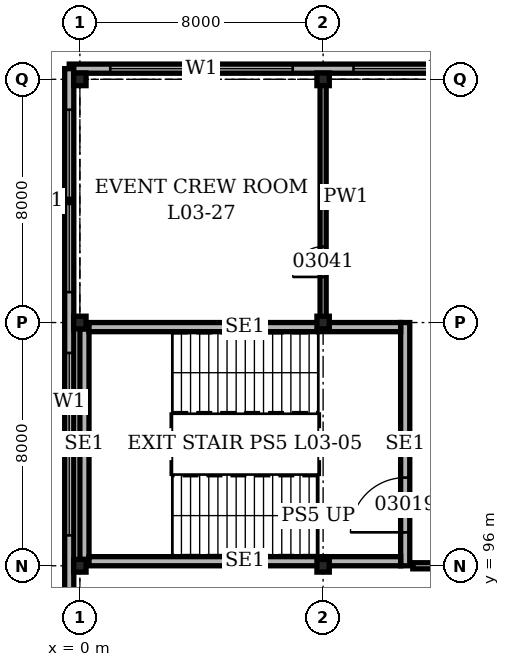
"""IFC4 building model, lengths in metres.
Left out: names, types, materials, properties, quantities, classifications, styles, units other than length and angle.
Written with IfcOpenShell. Run it as: python <this file> out.ifc"""

import sys

from ifc_helpers import new_model, si_unit, direction, frame, frame_2d, origin, origin_2d, place, context, subcontext, project, spatial, rectangle, i_section, extrude, element, fill, save


model = new_model("IFC4")
c1 = context("Model", 3, precision=1e-05, world=origin(), true_north=direction((0.0, 1.0)))
c2 = subcontext(c1, "Body", "Model", "MODEL_VIEW")
j1 = project(units=[si_unit("LENGTHUNIT", "METRE"), si_unit("PLANEANGLEUNIT", "RADIAN")], contexts=[c1])
p1 = place(None, origin())
s1 = spatial("IfcSite", under=j1, at=p1, CompositionType="ELEMENT")
p2 = place(p1, origin())
s2 = spatial("IfcBuilding", under=s1, at=p2, CompositionType="ELEMENT")
p3 = place(p2, frame((0.0, 0.0, 14.9)))
s3 = spatial("IfcBuildingStorey", under=s2, at=p3, CompositionType="ELEMENT", Elevation=14.9)
for number, where, z_axis, x_axis in (
    (1, (0.0, 96.0, 0.0), (0.0, 0.0, 1.0), (1.0, 0.0, 0.0)),
    (2, (0.0, 104.0, 0.0), (0.0, 0.0, 1.0), (1.0, 0.0, 0.0)),
    (3, (0.0, 112.0, 0.0), (0.0, 0.0, 1.0), (1.0, 0.0, 0.0)),
    (4, (8.0, 96.0, 0.0), (0.0, 0.0, 1.0), (1.0, 0.0, 0.0)),
    (5, (8.0, 104.0, 0.0), (0.0, 0.0, 1.0), (1.0, 0.0, 0.0)),
    (6, (8.0, 112.0, 0.0), (0.0, 0.0, 1.0), (1.0, 0.0, 0.0)),
):
    element("IfcColumn", number, at=place(p3, frame(where, z_axis=z_axis, x_axis=x_axis)), inside=s3, PredefinedType="COLUMN", context=c2, shape_type="SweptSolid", body=[
        extrude(i_section(OverallWidth=0.406, OverallDepth=0.417, WebThickness=0.03, FlangeThickness=0.048, at=origin_2d()), origin(), (0.0, 0.0, 1.0), 5.0),
    ])
p4 = place(p3, frame((112.35, 112.35, 0.0), z_axis=(0.0, 0.0, 1.0), x_axis=(-1.0, 0.0, 0.0)))
e7 = element("IfcWall", 7, at=p4, inside=s3, PredefinedType="SOLIDWALL", context=c2, shape_type="SweptSolid", body=[
    extrude(rectangle(XDim=112.7, YDim=0.3, at=frame_2d((56.35, 0.0))), origin(), (0.0, 0.0, 1.0), 5.0),
])
p5 = place(p4, frame((1.35, 0.0, 1.0)))
e8 = element("IfcOpeningElement", 8, at=p5, cuts=e7, PredefinedType="OPENING", context=c2, shape_type="SweptSolid", body=[
    extrude(rectangle(XDim=6.0, YDim=1.5, at=frame_2d((3.0, 0.75))), frame((0.0, 0.16, 0.0), z_axis=(0.0, -1.0, 0.0), x_axis=(1.0, 0.0, 0.0)), (0.0, 0.0, 1.0), 0.32),
])
p6 = place(p4, frame((9.35, 0.0, 1.0)))
e9 = element("IfcOpeningElement", 9, at=p6, cuts=e7, PredefinedType="OPENING", context=c2, shape_type="SweptSolid", body=[
    extrude(rectangle(XDim=6.0, YDim=1.5, at=frame_2d((3.0, 0.75))), frame((0.0, 0.16, 0.0), z_axis=(0.0, -1.0, 0.0), x_axis=(1.0, 0.0, 0.0)), (0.0, 0.0, 1.0), 0.32),
])
p7 = place(p4, frame((17.35, 0.0, 1.0)))
e10 = element("IfcOpeningElement", 10, at=p7, cuts=e7, PredefinedType="OPENING", context=c2, shape_type="SweptSolid", body=[
    extrude(rectangle(XDim=6.0, YDim=1.5, at=frame_2d((3.0, 0.75))), frame((0.0, 0.16, 0.0), z_axis=(0.0, -1.0, 0.0), x_axis=(1.0, 0.0, 0.0)), (0.0, 0.0, 1.0), 0.32),
])
p8 = place(p4, frame((25.35, 0.0, 1.0)))
e11 = element("IfcOpeningElement", 11, at=p8, cuts=e7, PredefinedType="OPENING", context=c2, shape_type="SweptSolid", body=[
    extrude(rectangle(XDim=6.0, YDim=1.5, at=frame_2d((3.0, 0.75))), frame((0.0, 0.16, 0.0), z_axis=(0.0, -1.0, 0.0), x_axis=(1.0, 0.0, 0.0)), (0.0, 0.0, 1.0), 0.32),
])
p9 = place(p4, frame((33.35, 0.0, 1.0)))
e12 = element("IfcOpeningElement", 12, at=p9, cuts=e7, PredefinedType="OPENING", context=c2, shape_type="SweptSolid", body=[
    extrude(rectangle(XDim=6.0, YDim=1.5, at=frame_2d((3.0, 0.75))), frame((0.0, 0.16, 0.0), z_axis=(0.0, -1.0, 0.0), x_axis=(1.0, 0.0, 0.0)), (0.0, 0.0, 1.0), 0.32),
])
p10 = place(p4, frame((41.35, 0.0, 1.0)))
e13 = element("IfcOpeningElement", 13, at=p10, cuts=e7, PredefinedType="OPENING", context=c2, shape_type="SweptSolid", body=[
    extrude(rectangle(XDim=6.0, YDim=1.5, at=frame_2d((3.0, 0.75))), frame((0.0, 0.16, 0.0), z_axis=(0.0, -1.0, 0.0), x_axis=(1.0, 0.0, 0.0)), (0.0, 0.0, 1.0), 0.32),
])
p11 = place(p4, frame((49.35, 0.0, 1.0)))
e14 = element("IfcOpeningElement", 14, at=p11, cuts=e7, PredefinedType="OPENING", context=c2, shape_type="SweptSolid", body=[
    extrude(rectangle(XDim=6.0, YDim=1.5, at=frame_2d((3.0, 0.75))), frame((0.0, 0.16, 0.0), z_axis=(0.0, -1.0, 0.0), x_axis=(1.0, 0.0, 0.0)), (0.0, 0.0, 1.0), 0.32),
])
p12 = place(p4, frame((57.35, 0.0, 1.0)))
e15 = element("IfcOpeningElement", 15, at=p12, cuts=e7, PredefinedType="OPENING", context=c2, shape_type="SweptSolid", body=[
    extrude(rectangle(XDim=6.0, YDim=1.5, at=frame_2d((3.0, 0.75))), frame((0.0, 0.16, 0.0), z_axis=(0.0, -1.0, 0.0), x_axis=(1.0, 0.0, 0.0)), (0.0, 0.0, 1.0), 0.32),
])
p13 = place(p4, frame((65.35, 0.0, 1.0)))
e16 = element("IfcOpeningElement", 16, at=p13, cuts=e7, PredefinedType="OPENING", context=c2, shape_type="SweptSolid", body=[
    extrude(rectangle(XDim=6.0, YDim=1.5, at=frame_2d((3.0, 0.75))), frame((0.0, 0.16, 0.0), z_axis=(0.0, -1.0, 0.0), x_axis=(1.0, 0.0, 0.0)), (0.0, 0.0, 1.0), 0.32),
])
p14 = place(p4, frame((73.35, 0.0, 1.0)))
e17 = element("IfcOpeningElement", 17, at=p14, cuts=e7, PredefinedType="OPENING", context=c2, shape_type="SweptSolid", body=[
    extrude(rectangle(XDim=6.0, YDim=1.5, at=frame_2d((3.0, 0.75))), frame((0.0, 0.16, 0.0), z_axis=(0.0, -1.0, 0.0), x_axis=(1.0, 0.0, 0.0)), (0.0, 0.0, 1.0), 0.32),
])
p15 = place(p4, frame((81.35, 0.0, 1.0)))
e18 = element("IfcOpeningElement", 18, at=p15, cuts=e7, PredefinedType="OPENING", context=c2, shape_type="SweptSolid", body=[
    extrude(rectangle(XDim=6.0, YDim=1.5, at=frame_2d((3.0, 0.75))), frame((0.0, 0.16, 0.0), z_axis=(0.0, -1.0, 0.0), x_axis=(1.0, 0.0, 0.0)), (0.0, 0.0, 1.0), 0.32),
])
p16 = place(p4, frame((89.35, 0.0, 1.0)))
e19 = element("IfcOpeningElement", 19, at=p16, cuts=e7, PredefinedType="OPENING", context=c2, shape_type="SweptSolid", body=[
    extrude(rectangle(XDim=6.0, YDim=1.5, at=frame_2d((3.0, 0.75))), frame((0.0, 0.16, 0.0), z_axis=(0.0, -1.0, 0.0), x_axis=(1.0, 0.0, 0.0)), (0.0, 0.0, 1.0), 0.32),
])
p17 = place(p4, frame((97.35, 0.0, 1.0)))
e20 = element("IfcOpeningElement", 20, at=p17, cuts=e7, PredefinedType="OPENING", context=c2, shape_type="SweptSolid", body=[
    extrude(rectangle(XDim=6.0, YDim=1.5, at=frame_2d((3.0, 0.75))), frame((0.0, 0.16, 0.0), z_axis=(0.0, -1.0, 0.0), x_axis=(1.0, 0.0, 0.0)), (0.0, 0.0, 1.0), 0.32),
])
p18 = place(p4, frame((105.35, 0.0, 1.0)))
e21 = element("IfcOpeningElement", 21, at=p18, cuts=e7, PredefinedType="OPENING", context=c2, shape_type="SweptSolid", body=[
    extrude(rectangle(XDim=6.0, YDim=1.5, at=frame_2d((3.0, 0.75))), frame((0.0, 0.16, 0.0), z_axis=(0.0, -1.0, 0.0), x_axis=(1.0, 0.0, 0.0)), (0.0, 0.0, 1.0), 0.32),
])
p19 = place(p3, frame((-0.35, 112.35, 0.0), z_axis=(0.0, 0.0, 1.0), x_axis=(0.0, -1.0, 0.0)))
e22 = element("IfcWall", 22, at=p19, inside=s3, PredefinedType="SOLIDWALL", context=c2, shape_type="SweptSolid", body=[
    extrude(rectangle(XDim=112.7, YDim=0.3, at=frame_2d((56.35, 0.0))), origin(), (0.0, 0.0, 1.0), 5.0),
])
p20 = place(p19, frame((1.35, 0.0, 1.0)))
e23 = element("IfcOpeningElement", 23, at=p20, cuts=e22, PredefinedType="OPENING", context=c2, shape_type="SweptSolid", body=[
    extrude(rectangle(XDim=6.0, YDim=1.5, at=frame_2d((3.0, 0.75))), frame((0.0, 0.16, 0.0), z_axis=(0.0, -1.0, 0.0), x_axis=(1.0, 0.0, 0.0)), (0.0, 0.0, 1.0), 0.32),
])
p21 = place(p19, frame((9.35, 0.0, 1.0)))
e24 = element("IfcOpeningElement", 24, at=p21, cuts=e22, PredefinedType="OPENING", context=c2, shape_type="SweptSolid", body=[
    extrude(rectangle(XDim=6.0, YDim=1.5, at=frame_2d((3.0, 0.75))), frame((0.0, 0.16, 0.0), z_axis=(0.0, -1.0, 0.0), x_axis=(1.0, 0.0, 0.0)), (0.0, 0.0, 1.0), 0.32),
])
p22 = place(p19, frame((17.35, 0.0, 1.0)))
e25 = element("IfcOpeningElement", 25, at=p22, cuts=e22, PredefinedType="OPENING", context=c2, shape_type="SweptSolid", body=[
    extrude(rectangle(XDim=6.0, YDim=1.5, at=frame_2d((3.0, 0.75))), frame((0.0, 0.16, 0.0), z_axis=(0.0, -1.0, 0.0), x_axis=(1.0, 0.0, 0.0)), (0.0, 0.0, 1.0), 0.32),
])
p23 = place(p19, frame((25.35, 0.0, 1.0)))
e26 = element("IfcOpeningElement", 26, at=p23, cuts=e22, PredefinedType="OPENING", context=c2, shape_type="SweptSolid", body=[
    extrude(rectangle(XDim=6.0, YDim=1.5, at=frame_2d((3.0, 0.75))), frame((0.0, 0.16, 0.0), z_axis=(0.0, -1.0, 0.0), x_axis=(1.0, 0.0, 0.0)), (0.0, 0.0, 1.0), 0.32),
])
p24 = place(p19, frame((33.35, 0.0, 1.0)))
e27 = element("IfcOpeningElement", 27, at=p24, cuts=e22, PredefinedType="OPENING", context=c2, shape_type="SweptSolid", body=[
    extrude(rectangle(XDim=6.0, YDim=1.5, at=frame_2d((3.0, 0.75))), frame((0.0, 0.16, 0.0), z_axis=(0.0, -1.0, 0.0), x_axis=(1.0, 0.0, 0.0)), (0.0, 0.0, 1.0), 0.32),
])
p25 = place(p19, frame((41.35, 0.0, 1.0)))
e28 = element("IfcOpeningElement", 28, at=p25, cuts=e22, PredefinedType="OPENING", context=c2, shape_type="SweptSolid", body=[
    extrude(rectangle(XDim=6.0, YDim=1.5, at=frame_2d((3.0, 0.75))), frame((0.0, 0.16, 0.0), z_axis=(0.0, -1.0, 0.0), x_axis=(1.0, 0.0, 0.0)), (0.0, 0.0, 1.0), 0.32),
])
p26 = place(p19, frame((49.35, 0.0, 1.0)))
e29 = element("IfcOpeningElement", 29, at=p26, cuts=e22, PredefinedType="OPENING", context=c2, shape_type="SweptSolid", body=[
    extrude(rectangle(XDim=6.0, YDim=1.5, at=frame_2d((3.0, 0.75))), frame((0.0, 0.16, 0.0), z_axis=(0.0, -1.0, 0.0), x_axis=(1.0, 0.0, 0.0)), (0.0, 0.0, 1.0), 0.32),
])
p27 = place(p19, frame((57.35, 0.0, 1.0)))
e30 = element("IfcOpeningElement", 30, at=p27, cuts=e22, PredefinedType="OPENING", context=c2, shape_type="SweptSolid", body=[
    extrude(rectangle(XDim=6.0, YDim=1.5, at=frame_2d((3.0, 0.75))), frame((0.0, 0.16, 0.0), z_axis=(0.0, -1.0, 0.0), x_axis=(1.0, 0.0, 0.0)), (0.0, 0.0, 1.0), 0.32),
])
p28 = place(p19, frame((65.35, 0.0, 1.0)))
e31 = element("IfcOpeningElement", 31, at=p28, cuts=e22, PredefinedType="OPENING", context=c2, shape_type="SweptSolid", body=[
    extrude(rectangle(XDim=6.0, YDim=1.5, at=frame_2d((3.0, 0.75))), frame((0.0, 0.16, 0.0), z_axis=(0.0, -1.0, 0.0), x_axis=(1.0, 0.0, 0.0)), (0.0, 0.0, 1.0), 0.32),
])
p29 = place(p19, frame((73.35, 0.0, 1.0)))
e32 = element("IfcOpeningElement", 32, at=p29, cuts=e22, PredefinedType="OPENING", context=c2, shape_type="SweptSolid", body=[
    extrude(rectangle(XDim=6.0, YDim=1.5, at=frame_2d((3.0, 0.75))), frame((0.0, 0.16, 0.0), z_axis=(0.0, -1.0, 0.0), x_axis=(1.0, 0.0, 0.0)), (0.0, 0.0, 1.0), 0.32),
])
p30 = place(p19, frame((81.35, 0.0, 1.0)))
e33 = element("IfcOpeningElement", 33, at=p30, cuts=e22, PredefinedType="OPENING", context=c2, shape_type="SweptSolid", body=[
    extrude(rectangle(XDim=6.0, YDim=1.5, at=frame_2d((3.0, 0.75))), frame((0.0, 0.16, 0.0), z_axis=(0.0, -1.0, 0.0), x_axis=(1.0, 0.0, 0.0)), (0.0, 0.0, 1.0), 0.32),
])
p31 = place(p19, frame((89.35, 0.0, 1.0)))
e34 = element("IfcOpeningElement", 34, at=p31, cuts=e22, PredefinedType="OPENING", context=c2, shape_type="SweptSolid", body=[
    extrude(rectangle(XDim=6.0, YDim=1.5, at=frame_2d((3.0, 0.75))), frame((0.0, 0.16, 0.0), z_axis=(0.0, -1.0, 0.0), x_axis=(1.0, 0.0, 0.0)), (0.0, 0.0, 1.0), 0.32),
])
p32 = place(p19, frame((97.35, 0.0, 1.0)))
e35 = element("IfcOpeningElement", 35, at=p32, cuts=e22, PredefinedType="OPENING", context=c2, shape_type="SweptSolid", body=[
    extrude(rectangle(XDim=6.0, YDim=1.5, at=frame_2d((3.0, 0.75))), frame((0.0, 0.16, 0.0), z_axis=(0.0, -1.0, 0.0), x_axis=(1.0, 0.0, 0.0)), (0.0, 0.0, 1.0), 0.32),
])
p33 = place(p19, frame((105.35, 0.0, 1.0)))
e36 = element("IfcOpeningElement", 36, at=p33, cuts=e22, PredefinedType="OPENING", context=c2, shape_type="SweptSolid", body=[
    extrude(rectangle(XDim=6.0, YDim=1.5, at=frame_2d((3.0, 0.75))), frame((0.0, 0.16, 0.0), z_axis=(0.0, -1.0, 0.0), x_axis=(1.0, 0.0, 0.0)), (0.0, 0.0, 1.0), 0.32),
])
p34 = place(p3, frame((0.15, 96.208, 0.0), z_axis=(0.0, 0.0, 1.0), x_axis=(0.0, 1.0, 0.0)))
e37 = element("IfcWall", 37, at=p34, inside=s3, PredefinedType="SOLIDWALL", context=c2, shape_type="SweptSolid", body=[
    extrude(rectangle(XDim=7.583, YDim=0.3, at=frame_2d((3.792, 0.0))), origin(), (0.0, 0.0, 1.0), 4.8),
])
p35 = place(p3, frame((10.7, 96.0, 0.0), z_axis=(0.0, 0.0, 1.0), x_axis=(0.0, 1.0, 0.0)))
e38 = element("IfcWall", 38, at=p35, inside=s3, PredefinedType="SOLIDWALL", context=c2, shape_type="SweptSolid", body=[
    extrude(rectangle(XDim=8.0, YDim=0.3, at=frame_2d((4.0, 0.0))), origin(), (0.0, 0.0, 1.0), 4.8),
])
p36 = place(p35, frame((1.1, 0.0, 0.0)))
e39 = element("IfcOpeningElement", 39, at=p36, cuts=e38, PredefinedType="OPENING", context=c2, shape_type="SweptSolid", body=[
    extrude(rectangle(XDim=1.8, YDim=2.1, at=frame_2d((0.9, 1.05))), frame((0.0, 0.16, 0.0), z_axis=(0.0, -1.0, 0.0), x_axis=(1.0, 0.0, 0.0)), (0.0, 0.0, 1.0), 0.32),
])
for number, where, z_axis, x_axis in (
    (40, (0.3, 96.15, 0.0), (0.0, 0.0, 1.0), (1.0, 0.0, 0.0)),
    (41, (0.3, 103.85, 0.0), (0.0, 0.0, 1.0), (1.0, 0.0, 0.0)),
):
    element("IfcWall", number, at=place(p3, frame(where, z_axis=z_axis, x_axis=x_axis)), inside=s3, PredefinedType="SOLIDWALL", context=c2, shape_type="SweptSolid", body=[
        extrude(rectangle(XDim=10.25, YDim=0.3, at=frame_2d((5.125, 0.0))), origin(), (0.0, 0.0, 1.0), 4.8),
    ])
p37 = place(p3, frame((10.95, 96.0, 0.0), z_axis=(0.0, 0.0, 1.0), x_axis=(1.0, 0.0, 0.0)))
e42 = element("IfcWall", 42, at=p37, inside=s3, PredefinedType="PARTITIONING", context=c2, shape_type="SweptSolid", body=[
    extrude(rectangle(XDim=28.95, YDim=0.2, at=frame_2d((14.475, 0.0))), origin(), (0.0, 0.0, 1.0), 4.028),
])
p38 = place(p3, frame((8.0, 104.1, 0.0), z_axis=(0.0, 0.0, 1.0), x_axis=(0.0, 1.0, 0.0)))
e43 = element("IfcWall", 43, at=p38, inside=s3, PredefinedType="PARTITIONING", context=c2, shape_type="SweptSolid", body=[
    extrude(rectangle(XDim=8.05, YDim=0.2, at=frame_2d((4.025, 0.0))), origin(), (0.0, 0.0, 1.0), 4.028),
])
p39 = place(p38, frame((1.4, 0.0, 0.0)))
e44 = element("IfcOpeningElement", 44, at=p39, cuts=e43, PredefinedType="OPENING", context=c2, shape_type="SweptSolid", body=[
    extrude(rectangle(XDim=1.0, YDim=2.1, at=frame_2d((0.5, 1.05))), frame((0.0, 0.11, 0.0), z_axis=(0.0, -1.0, 0.0), x_axis=(1.0, 0.0, 0.0)), (0.0, 0.0, 1.0), 0.22),
])
p40 = place(p17, origin())
e45 = element("IfcWindow", 45, at=p40, inside=s3, PartitioningType="SINGLE_PANEL", PredefinedType="WINDOW", context=c2, shape_type="SweptSolid", body=[
    extrude(rectangle(XDim=6.0, YDim=1.5, at=frame_2d((3.0, 0.75))), frame((0.0, 0.03, 0.0), z_axis=(0.0, -1.0, 0.0), x_axis=(1.0, 0.0, 0.0)), (0.0, 0.0, 1.0), 0.06),
])
fill(e20, e45)
p41 = place(p18, origin())
e46 = element("IfcWindow", 46, at=p41, inside=s3, PartitioningType="SINGLE_PANEL", PredefinedType="WINDOW", context=c2, shape_type="SweptSolid", body=[
    extrude(rectangle(XDim=6.0, YDim=1.5, at=frame_2d((3.0, 0.75))), frame((0.0, 0.03, 0.0), z_axis=(0.0, -1.0, 0.0), x_axis=(1.0, 0.0, 0.0)), (0.0, 0.0, 1.0), 0.06),
])
fill(e21, e46)
p42 = place(p20, origin())
e47 = element("IfcWindow", 47, at=p42, inside=s3, PartitioningType="SINGLE_PANEL", PredefinedType="WINDOW", context=c2, shape_type="SweptSolid", body=[
    extrude(rectangle(XDim=6.0, YDim=1.5, at=frame_2d((3.0, 0.75))), frame((0.0, 0.03, 0.0), z_axis=(0.0, -1.0, 0.0), x_axis=(1.0, 0.0, 0.0)), (0.0, 0.0, 1.0), 0.06),
])
fill(e23, e47)
p43 = place(p21, origin())
e48 = element("IfcWindow", 48, at=p43, inside=s3, PartitioningType="SINGLE_PANEL", PredefinedType="WINDOW", context=c2, shape_type="SweptSolid", body=[
    extrude(rectangle(XDim=6.0, YDim=1.5, at=frame_2d((3.0, 0.75))), frame((0.0, 0.03, 0.0), z_axis=(0.0, -1.0, 0.0), x_axis=(1.0, 0.0, 0.0)), (0.0, 0.0, 1.0), 0.06),
])
fill(e24, e48)
p44 = place(p36, origin())
e49 = element("IfcDoor", 49, at=p44, inside=s3, OperationType="DOUBLE_DOOR_SINGLE_SWING", PredefinedType="DOOR", context=c2, shape_type="SweptSolid", body=[
    extrude(rectangle(XDim=1.8, YDim=2.1, at=frame_2d((0.9, 1.05))), frame((0.0, 0.15, 0.0), z_axis=(0.0, -1.0, 0.0), x_axis=(1.0, 0.0, 0.0)), (0.0, 0.0, 1.0), 0.3),
])
fill(e39, e49)
p45 = place(p39, origin())
e50 = element("IfcDoor", 50, at=p45, inside=s3, OperationType="SINGLE_SWING_LEFT", PredefinedType="DOOR", context=c2, shape_type="SweptSolid", body=[
    extrude(rectangle(XDim=1.0, YDim=2.1, at=frame_2d((0.5, 1.05))), frame((0.0, 0.1, 0.0), z_axis=(0.0, -1.0, 0.0), x_axis=(1.0, 0.0, 0.0)), (0.0, 0.0, 1.0), 0.199),
])
fill(e44, e50)
save(model, sys.argv[1])
